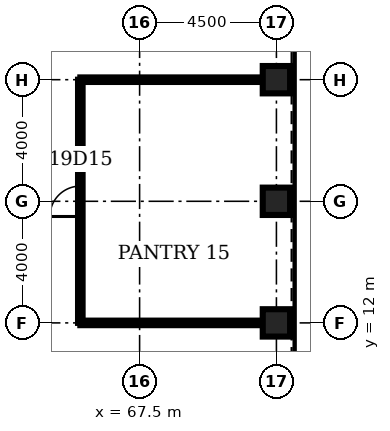
"""IFC4 building model, lengths in metres.
Left out: names, types, materials, properties, quantities, classifications, styles, units other than length and angle.
Written with IfcOpenShell. Run it as: python <this file> out.ifc"""

import sys

from ifc_helpers import new_model, si_unit, direction, frame, frame_2d, origin, origin_2d, place, context, subcontext, project, spatial, rectangle, hollow_rectangle, extrude, element, fill, save


model = new_model("IFC4")
c1 = context("Model", 3, precision=1e-05, world=origin(), true_north=direction((0.0, 1.0)))
c2 = subcontext(c1, "Body", "Model", "MODEL_VIEW")
j1 = project(units=[si_unit("LENGTHUNIT", "METRE"), si_unit("PLANEANGLEUNIT", "RADIAN")], contexts=[c1])
p1 = place(None, origin())
s1 = spatial("IfcSite", under=j1, at=p1, CompositionType="ELEMENT")
p2 = place(p1, origin())
s2 = spatial("IfcBuilding", under=s1, at=p2, CompositionType="ELEMENT")
p3 = place(p2, frame((0.0, 0.0, 90.5)))
s3 = spatial("IfcBuildingStorey", under=s2, at=p3, CompositionType="ELEMENT", Elevation=90.5)
for number, where, z_axis, x_axis in (
    (1, (72.0, 12.0, 0.0), (0.0, 0.0, 1.0), (1.0, 0.0, 0.0)),
    (2, (72.0, 16.0, 0.0), (0.0, 0.0, 1.0), (1.0, 0.0, 0.0)),
    (3, (72.0, 20.0, 0.0), (0.0, 0.0, 1.0), (1.0, 0.0, 0.0)),
):
    element("IfcColumn", number, at=place(p3, frame(where, z_axis=z_axis, x_axis=x_axis)), inside=s3, PredefinedType="COLUMN", context=c2, shape_type="SweptSolid", body=[
        extrude(hollow_rectangle(XDim=0.9, YDim=0.9, WallThickness=0.11, at=origin_2d()), origin(), (0.0, 0.0, 1.0), 4.5),
    ])
for number, where, z_axis, x_axis in (
    (4, (65.55, 12.0, 0.0), (0.0, 0.0, 1.0), (1.0, 0.0, 0.0)),
    (5, (65.55, 20.0, 0.0), (0.0, 0.0, 1.0), (1.0, 0.0, 0.0)),
):
    element("IfcWall", number, at=place(p3, frame(where, z_axis=z_axis, x_axis=x_axis)), inside=s3, PredefinedType="PARTITIONING", context=c2, shape_type="SweptSolid", body=[
        extrude(rectangle(XDim=6.0, YDim=0.15, at=frame_2d((3.0, 0.0))), origin(), (0.0, 0.0, 1.0), 3.0),
    ])
p4 = place(p3, frame((65.55, 12.0, 0.0), z_axis=(0.0, 0.0, 1.0), x_axis=(0.0, 1.0, 0.0)))
e6 = element("IfcWall", 6, at=p4, inside=s3, PredefinedType="PARTITIONING", context=c2, shape_type="SweptSolid", body=[
    extrude(rectangle(XDim=8.0, YDim=0.15, at=frame_2d((4.0, 0.0))), origin(), (0.0, 0.0, 1.0), 3.0),
])
p5 = place(p4, frame((3.5, 0.0, 0.0)))
e7 = element("IfcOpeningElement", 7, at=p5, cuts=e6, PredefinedType="OPENING", context=c2, shape_type="SweptSolid", body=[
    extrude(rectangle(XDim=1.0, YDim=2.1, at=frame_2d((0.5, 1.05))), frame((0.0, 0.085, 0.0), z_axis=(0.0, -1.0, 0.0), x_axis=(1.0, 0.0, 0.0)), (0.0, 0.0, 1.0), 0.17),
])
p6 = place(p5, origin())
e8 = element("IfcDoor", 8, at=p6, inside=s3, OperationType="SINGLE_SWING_LEFT", PredefinedType="DOOR", context=c2, shape_type="SweptSolid", body=[
    extrude(rectangle(XDim=1.0, YDim=2.1, at=frame_2d((0.5, 1.05))), frame((0.0, 0.025, 0.0), z_axis=(0.0, -1.0, 0.0), x_axis=(1.0, 0.0, 0.0)), (0.0, 0.0, 1.0), 0.05),
])
fill(e7, e8)
save(model, sys.argv[1])
